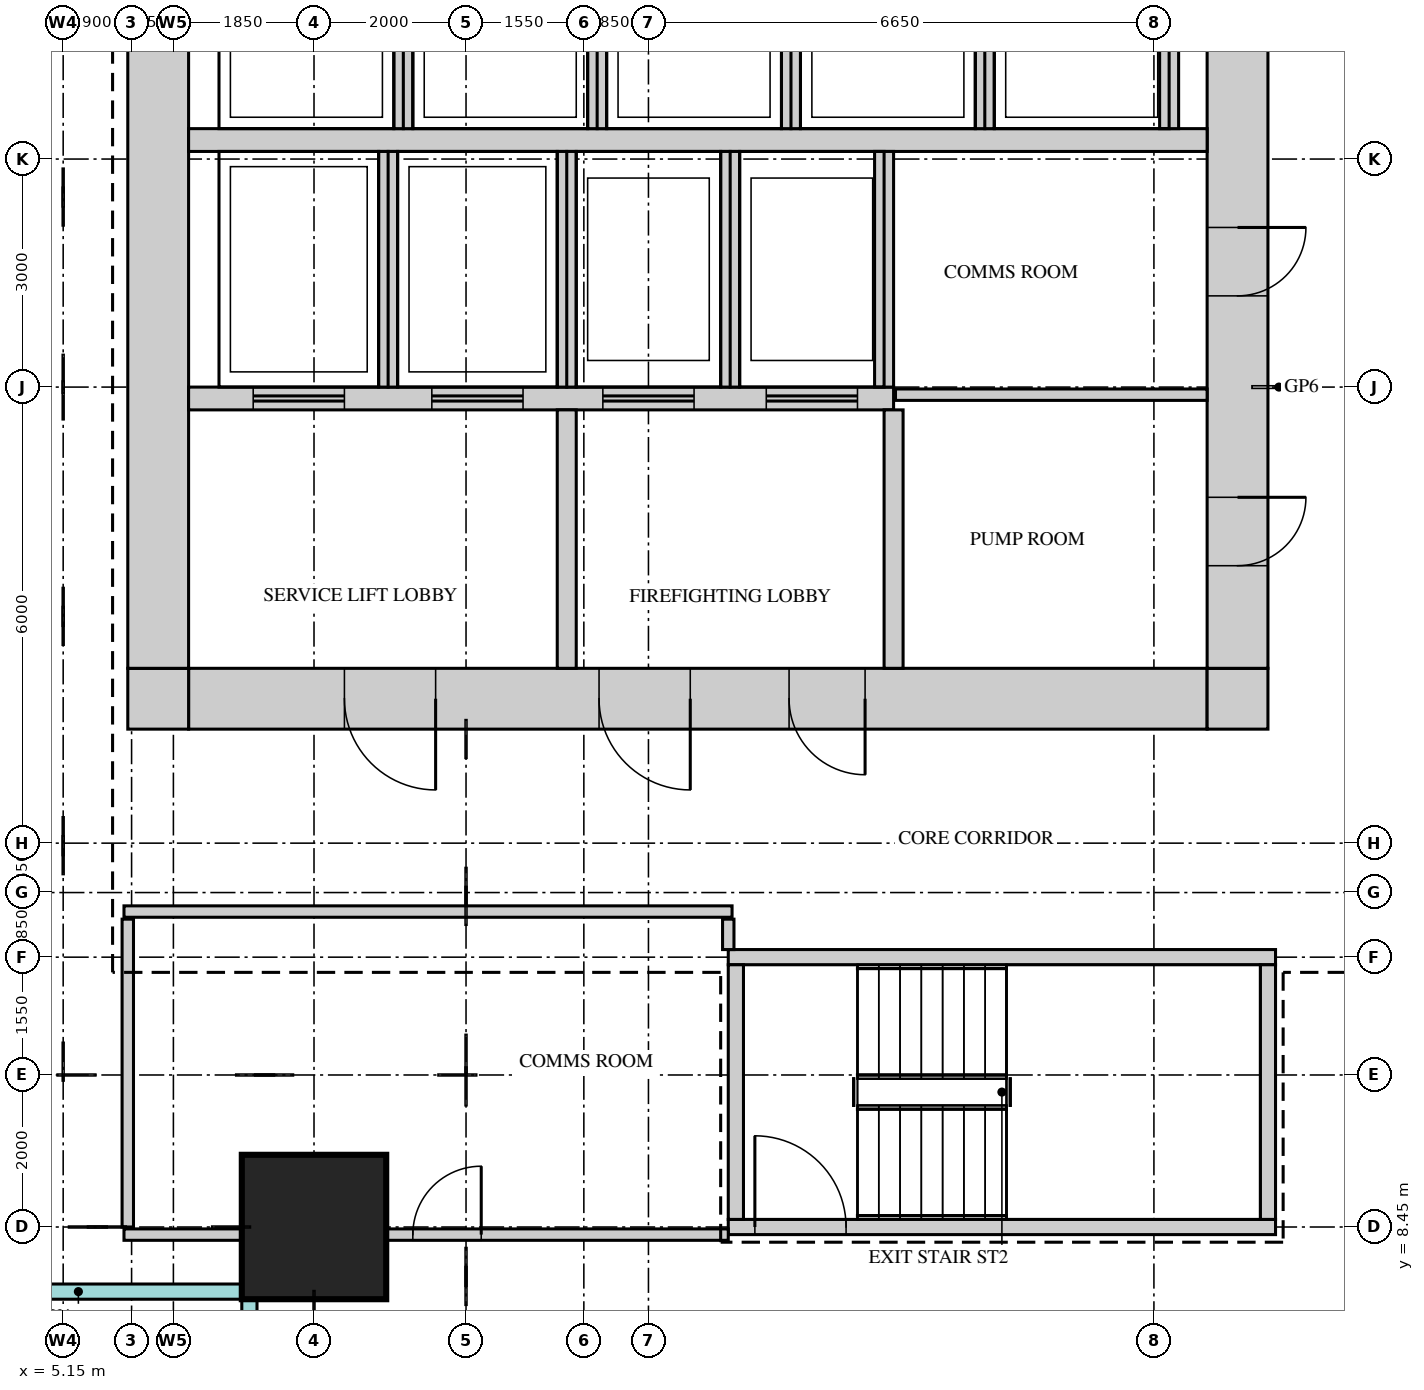
"""IFC4 building model, lengths in metres.
Left out: names, types, materials, properties, quantities, classifications, styles, units other than length and angle.
Written with IfcOpenShell. Run it as: python <this file> out.ifc"""

import sys

from ifc_helpers import new_model, si_unit, direction, frame, frame_2d, origin, origin_2d, place, context, subcontext, project, spatial, rectangle, extrude, source, transform, mapped, element, fill, save


model = new_model("IFC4")
c1 = context("Model", 3, precision=1e-05, world=origin(), true_north=direction((0.0, 1.0)))
c2 = subcontext(c1, "Body", "Model", "MODEL_VIEW")
j1 = project(units=[si_unit("LENGTHUNIT", "METRE"), si_unit("PLANEANGLEUNIT", "RADIAN")], contexts=[c1])
p1 = place(None, origin())
s1 = spatial("IfcSite", under=j1, at=p1, CompositionType="ELEMENT")
p2 = place(p1, origin())
s2 = spatial("IfcBuilding", under=s1, at=p2, CompositionType="ELEMENT")
p3 = place(p2, frame((0.0, 0.0, 216.7)))
s3 = spatial("IfcBuildingStorey", under=s2, at=p3, CompositionType="ELEMENT", Elevation=216.7)
m1 = source(origin(), c2, "Body", "SweptSolid", [
    extrude(rectangle(XDim=13.4, YDim=0.8, at=frame_2d((6.7, 0.0))), origin(), (0.0, 0.0, 1.0), 5.25),
])
p4 = place(p3, frame((6.8, 15.4, 0.0), z_axis=(0.0, 0.0, 1.0), x_axis=(1.0, 0.0, 0.0)))
e1 = element("IfcWall", 1, at=p4, inside=s3, PredefinedType="SHEAR", context=c2, shape_type="MappedRepresentation", body=[
    mapped(m1, transform((0.0, 0.0, 0.0))),
])
m2 = source(origin(), c2, "Body", "SweptSolid", [
    extrude(rectangle(XDim=1.2, YDim=2.1, at=frame_2d((0.6, 1.05))), frame((0.0, 0.41, 0.0), z_axis=(0.0, -1.0, 0.0), x_axis=(1.0, 0.0, 0.0)), (0.0, 0.0, 1.0), 0.82),
])
p5 = place(p4, frame((5.4, 0.0, 0.0)))
e2 = element("IfcOpeningElement", 2, at=p5, cuts=e1, PredefinedType="OPENING", context=c2, shape_type="MappedRepresentation", body=[
    mapped(m2, transform((0.0, 0.0, 0.0))),
])
p6 = place(p4, frame((2.05, 0.0, 0.0)))
e3 = element("IfcOpeningElement", 3, at=p6, cuts=e1, PredefinedType="OPENING", context=c2, shape_type="MappedRepresentation", body=[
    mapped(m2, transform((0.0, 0.0, 0.0))),
])
m3 = source(origin(), c2, "Body", "SweptSolid", [
    extrude(rectangle(XDim=1.0, YDim=2.1, at=frame_2d((0.5, 1.05))), frame((0.0, 0.41, 0.0), z_axis=(0.0, -1.0, 0.0), x_axis=(1.0, 0.0, 0.0)), (0.0, 0.0, 1.0), 0.82),
])
p7 = place(p4, frame((7.9, 0.0, 0.0)))
e4 = element("IfcOpeningElement", 4, at=p7, cuts=e1, PredefinedType="OPENING", context=c2, shape_type="MappedRepresentation", body=[
    mapped(m3, transform((0.0, 0.0, 0.0))),
])
m4 = source(origin(), c2, "Body", "SweptSolid", [
    extrude(rectangle(XDim=0.8, YDim=0.8, at=frame_2d((0.4, 0.0))), origin(), (0.0, 0.0, 1.0), 5.25),
])
for number, where, z_axis, x_axis in (
    (5, (20.2, 15.4, 0.0), (0.0, 0.0, 1.0), (1.0, 0.0, 0.0)),
    (6, (6.0, 15.4, 0.0), (0.0, 0.0, 1.0), (1.0, 0.0, 0.0)),
):
    element("IfcWall", number, at=place(p3, frame(where, z_axis=z_axis, x_axis=x_axis)), inside=s3, PredefinedType="SHEAR", context=c2, shape_type="MappedRepresentation", body=[
        mapped(m4, transform((0.0, 0.0, 0.0))),
    ])
m5 = source(origin(), c2, "Body", "SweptSolid", [
    extrude(rectangle(XDim=22.4, YDim=0.8, at=frame_2d((11.2, 0.0))), origin(), (0.0, 0.0, 1.0), 5.25),
])
p8 = place(p3, frame((20.6, 15.8, 0.0), z_axis=(0.0, 0.0, 1.0), x_axis=(0.0, 1.0, 0.0)))
e7 = element("IfcWall", 7, at=p8, inside=s3, PredefinedType="SHEAR", context=c2, shape_type="MappedRepresentation", body=[
    mapped(m5, transform((0.0, 0.0, 0.0))),
])
m6 = source(origin(), c2, "Body", "SweptSolid", [
    extrude(rectangle(XDim=1.8, YDim=2.1, at=frame_2d((0.9, 1.05))), frame((0.0, 0.41, 0.0), z_axis=(0.0, -1.0, 0.0), x_axis=(1.0, 0.0, 0.0)), (0.0, 0.0, 1.0), 0.82),
])
p9 = place(p8, frame((10.7, 0.0, 0.0)))
e8 = element("IfcOpeningElement", 8, at=p9, cuts=e7, PredefinedType="OPENING", context=c2, shape_type="MappedRepresentation", body=[
    mapped(m6, transform((0.0, 0.0, 0.0))),
])
m7 = source(origin(), c2, "Body", "SweptSolid", [
    extrude(rectangle(XDim=0.9, YDim=2.1, at=frame_2d((0.45, 1.05))), frame((0.0, 0.41, 0.0), z_axis=(0.0, -1.0, 0.0), x_axis=(1.0, 0.0, 0.0)), (0.0, 0.0, 1.0), 0.82),
])
p10 = place(p8, frame((1.35, 0.0, 0.0)))
e9 = element("IfcOpeningElement", 9, at=p10, cuts=e7, PredefinedType="OPENING", context=c2, shape_type="MappedRepresentation", body=[
    mapped(m7, transform((0.0, 0.0, 0.0))),
])
p11 = place(p8, frame((4.9, 0.0, 0.0)))
e10 = element("IfcOpeningElement", 10, at=p11, cuts=e7, PredefinedType="OPENING", context=c2, shape_type="MappedRepresentation", body=[
    mapped(m7, transform((0.0, 0.0, 0.0))),
])
p12 = place(p3, frame((6.4, 15.8, 0.0), z_axis=(0.0, 0.0, 1.0), x_axis=(0.0, 1.0, 0.0)))
e11 = element("IfcWall", 11, at=p12, inside=s3, PredefinedType="SHEAR", context=c2, shape_type="MappedRepresentation", body=[
    mapped(m5, transform((0.0, 0.0, 0.0))),
])
m8 = source(origin(), c2, "Body", "SweptSolid", [
    extrude(rectangle(XDim=7.2, YDim=0.2, at=frame_2d((3.6, 0.0))), origin(), (0.0, 0.0, 1.0), 5.25),
])
p13 = place(p3, frame((13.9, 12.0, 0.0), z_axis=(0.0, 0.0, 1.0), x_axis=(1.0, 0.0, 0.0)))
e12 = element("IfcWall", 12, at=p13, inside=s3, PredefinedType="SHEAR", context=c2, shape_type="MappedRepresentation", body=[
    mapped(m8, transform((0.0, 0.0, 0.0))),
])
p14 = place(p3, frame((13.9, 8.45, 0.0), z_axis=(0.0, 0.0, 1.0), x_axis=(1.0, 0.0, 0.0)))
e13 = element("IfcWall", 13, at=p14, inside=s3, PredefinedType="SHEAR", context=c2, shape_type="MappedRepresentation", body=[
    mapped(m8, transform((0.0, 0.0, 0.0))),
])
m9 = source(origin(), c2, "Body", "SweptSolid", [
    extrude(rectangle(XDim=1.2, YDim=2.1, at=frame_2d((0.6, 1.05))), frame((0.0, 0.11, 0.0), z_axis=(0.0, -1.0, 0.0), x_axis=(1.0, 0.0, 0.0)), (0.0, 0.0, 1.0), 0.22),
])
p15 = place(p14, frame((0.35, 0.0, 0.0)))
e14 = element("IfcOpeningElement", 14, at=p15, cuts=e13, PredefinedType="OPENING", context=c2, shape_type="MappedRepresentation", body=[
    mapped(m9, transform((0.0, 0.0, 0.0))),
])
m10 = source(origin(), c2, "Body", "SweptSolid", [
    extrude(rectangle(XDim=3.35, YDim=0.2, at=frame_2d((1.675, 0.0))), origin(), (0.0, 0.0, 1.0), 5.25),
])
for number, where, z_axis, x_axis in (
    (15, (21.0, 8.55, 0.0), (0.0, 0.0, 1.0), (0.0, 1.0, 0.0)),
    (16, (14.0, 8.55, 0.0), (0.0, 0.0, 1.0), (0.0, 1.0, 0.0)),
):
    element("IfcWall", number, at=place(p3, frame(where, z_axis=z_axis, x_axis=x_axis)), inside=s3, PredefinedType="SHEAR", context=c2, shape_type="MappedRepresentation", body=[
        mapped(m10, transform((0.0, 0.0, 0.0))),
    ])
m11 = source(origin(), c2, "Body", "SweptSolid", [
    extrude(rectangle(XDim=13.4, YDim=0.3, at=frame_2d((6.7, 0.0))), origin(), (0.0, 0.0, 1.0), 5.25),
])
p16 = place(p3, frame((6.8, 22.75, 0.0), z_axis=(0.0, 0.0, 1.0), x_axis=(1.0, 0.0, 0.0)))
e17 = element("IfcWall", 17, at=p16, inside=s3, PredefinedType="STANDARD", context=c2, shape_type="MappedRepresentation", body=[
    mapped(m11, transform((0.0, 0.0, 0.0))),
])
m12 = source(origin(), c2, "Body", "SweptSolid", [
    extrude(rectangle(XDim=9.275, YDim=0.3, at=frame_2d((4.637, 0.0))), origin(), (0.0, 0.0, 1.0), 5.25),
])
p17 = place(p3, frame((6.8, 19.35, 0.0), z_axis=(0.0, 0.0, 1.0), x_axis=(1.0, 0.0, 0.0)))
e18 = element("IfcWall", 18, at=p17, inside=s3, PredefinedType="STANDARD", context=c2, shape_type="MappedRepresentation", body=[
    mapped(m12, transform((0.0, 0.0, 0.0))),
])
m13 = source(origin(), c2, "Body", "SweptSolid", [
    extrude(rectangle(XDim=1.2, YDim=2.1, at=frame_2d((0.6, 1.05))), frame((0.0, 0.16, 0.0), z_axis=(0.0, -1.0, 0.0), x_axis=(1.0, 0.0, 0.0)), (0.0, 0.0, 1.0), 0.32),
])
p18 = place(p17, frame((0.85, 0.0, 0.0)))
e19 = element("IfcOpeningElement", 19, at=p18, cuts=e18, PredefinedType="OPENING", context=c2, shape_type="MappedRepresentation", body=[
    mapped(m13, transform((0.0, 0.0, 0.0))),
])
p19 = place(p17, frame((3.2, 0.0, 0.0)))
e20 = element("IfcOpeningElement", 20, at=p19, cuts=e18, PredefinedType="OPENING", context=c2, shape_type="MappedRepresentation", body=[
    mapped(m13, transform((0.0, 0.0, 0.0))),
])
p20 = place(p17, frame((5.45, 0.0, 0.0)))
e21 = element("IfcOpeningElement", 21, at=p20, cuts=e18, PredefinedType="OPENING", context=c2, shape_type="MappedRepresentation", body=[
    mapped(m13, transform((0.0, 0.0, 0.0))),
])
p21 = place(p17, frame((7.6, 0.0, 0.0)))
e22 = element("IfcOpeningElement", 22, at=p21, cuts=e18, PredefinedType="OPENING", context=c2, shape_type="MappedRepresentation", body=[
    mapped(m13, transform((0.0, 0.0, 0.0))),
])
m14 = source(origin(), c2, "Body", "SweptSolid", [
    extrude(rectangle(XDim=3.1, YDim=0.25, at=frame_2d((1.55, 0.0))), origin(), (0.0, 0.0, 1.0), 5.25),
])
for number, where, z_axis, x_axis in (
    (23, (9.425, 19.5, 0.0), (0.0, 0.0, 1.0), (0.0, 1.0, 0.0)),
    (24, (11.775, 19.5, 0.0), (0.0, 0.0, 1.0), (0.0, 1.0, 0.0)),
    (25, (13.925, 19.5, 0.0), (0.0, 0.0, 1.0), (0.0, 1.0, 0.0)),
    (26, (15.95, 19.5, 0.0), (0.0, 0.0, 1.0), (0.0, 1.0, 0.0)),
):
    element("IfcWall", number, at=place(p3, frame(where, z_axis=z_axis, x_axis=x_axis)), inside=s3, PredefinedType="STANDARD", context=c2, shape_type="MappedRepresentation", body=[
        mapped(m14, transform((0.0, 0.0, 0.0))),
    ])
m15 = source(origin(), c2, "Body", "SweptSolid", [
    extrude(rectangle(XDim=2.4, YDim=0.25, at=frame_2d((1.2, 0.0))), origin(), (0.0, 0.0, 1.0), 5.25),
])
for number, where, z_axis, x_axis in (
    (27, (17.275, 22.9, 0.0), (0.0, 0.0, 1.0), (0.0, 1.0, 0.0)),
    (28, (19.7, 22.9, 0.0), (0.0, 0.0, 1.0), (0.0, 1.0, 0.0)),
    (29, (9.625, 22.9, 0.0), (0.0, 0.0, 1.0), (0.0, 1.0, 0.0)),
    (30, (12.175, 22.9, 0.0), (0.0, 0.0, 1.0), (0.0, 1.0, 0.0)),
    (31, (14.725, 22.9, 0.0), (0.0, 0.0, 1.0), (0.0, 1.0, 0.0)),
):
    element("IfcWall", number, at=place(p3, frame(where, z_axis=z_axis, x_axis=x_axis)), inside=s3, PredefinedType="STANDARD", context=c2, shape_type="MappedRepresentation", body=[
        mapped(m15, transform((0.0, 0.0, 0.0))),
    ])
m16 = source(origin(), c2, "Body", "SweptSolid", [
    extrude(rectangle(XDim=3.4, YDim=0.25, at=frame_2d((1.7, 0.0))), origin(), (0.0, 0.0, 1.0), 5.25),
])
for number, where, z_axis, x_axis in (
    (32, (16.075, 15.8, 0.0), (0.0, 0.0, 1.0), (0.0, 1.0, 0.0)),
    (33, (11.775, 15.8, 0.0), (0.0, 0.0, 1.0), (0.0, 1.0, 0.0)),
):
    element("IfcWall", number, at=place(p3, frame(where, z_axis=z_axis, x_axis=x_axis)), inside=s3, PredefinedType="STANDARD", context=c2, shape_type="MappedRepresentation", body=[
        mapped(m16, transform((0.0, 0.0, 0.0))),
    ])
m17 = source(origin(), c2, "Body", "SweptSolid", [
    extrude(rectangle(XDim=1.9, YDim=1.9, at=origin_2d()), origin(), (0.0, 0.0, 1.0), 5.5),
])
p22 = place(p3, frame((8.45, 8.45, 0.0), z_axis=(0.0, 0.0, 1.0), x_axis=(1.0, 0.0, 0.0)))
e34 = element("IfcColumn", 34, at=p22, inside=s3, PredefinedType="COLUMN", context=c2, shape_type="MappedRepresentation", body=[
    mapped(m17, transform((0.0, 0.0, 0.0))),
])
m18 = source(origin(), c2, "Body", "SweptSolid", [
    extrude(rectangle(XDim=7.95, YDim=0.15, at=frame_2d((3.975, 0.0))), origin(), (0.0, 0.0, 1.0), 5.25),
])
p23 = place(p3, frame((5.95, 8.35, 0.0), z_axis=(0.0, 0.0, 1.0), x_axis=(1.0, 0.0, 0.0)))
e35 = element("IfcWall", 35, at=p23, inside=s3, PredefinedType="PARTITIONING", context=c2, shape_type="MappedRepresentation", body=[
    mapped(m18, transform((0.0, 0.0, 0.0))),
])
m19 = source(origin(), c2, "Body", "SweptSolid", [
    extrude(rectangle(XDim=0.9, YDim=2.1, at=frame_2d((0.45, 1.05))), frame((0.0, 0.085, 0.0), z_axis=(0.0, -1.0, 0.0), x_axis=(1.0, 0.0, 0.0)), (0.0, 0.0, 1.0), 0.17),
])
p24 = place(p23, frame((3.8, 0.0, 0.0)))
e36 = element("IfcOpeningElement", 36, at=p24, cuts=e35, PredefinedType="OPENING", context=c2, shape_type="MappedRepresentation", body=[
    mapped(m19, transform((0.0, 0.0, 0.0))),
])
m20 = source(origin(), c2, "Body", "SweptSolid", [
    extrude(rectangle(XDim=4.05, YDim=0.15, at=frame_2d((2.025, 0.0))), origin(), (0.0, 0.0, 1.0), 5.25),
])
p25 = place(p3, frame((6.0, 8.45, 0.0), z_axis=(0.0, 0.0, 1.0), x_axis=(0.0, 1.0, 0.0)))
e37 = element("IfcWall", 37, at=p25, inside=s3, PredefinedType="PARTITIONING", context=c2, shape_type="MappedRepresentation", body=[
    mapped(m20, transform((0.0, 0.0, 0.0))),
])
m21 = source(origin(), c2, "Body", "SweptSolid", [
    extrude(rectangle(XDim=0.4, YDim=0.15, at=frame_2d((0.2, 0.0))), origin(), (0.0, 0.0, 1.0), 5.25),
])
p26 = place(p3, frame((13.9, 12.1, 0.0), z_axis=(0.0, 0.0, 1.0), x_axis=(0.0, 1.0, 0.0)))
e38 = element("IfcWall", 38, at=p26, inside=s3, PredefinedType="PARTITIONING", context=c2, shape_type="MappedRepresentation", body=[
    mapped(m21, transform((0.0, 0.0, 0.0))),
])
m22 = source(origin(), c2, "Body", "SweptSolid", [
    extrude(rectangle(XDim=8.0, YDim=0.15, at=frame_2d((4.0, 0.0))), origin(), (0.0, 0.0, 1.0), 5.25),
])
p27 = place(p3, frame((5.95, 12.6, 0.0), z_axis=(0.0, 0.0, 1.0), x_axis=(1.0, 0.0, 0.0)))
e39 = element("IfcWall", 39, at=p27, inside=s3, PredefinedType="PARTITIONING", context=c2, shape_type="MappedRepresentation", body=[
    mapped(m22, transform((0.0, 0.0, 0.0))),
])
m23 = source(origin(), c2, "Body", "SweptSolid", [
    extrude(rectangle(XDim=4.1, YDim=0.15, at=frame_2d((2.05, 0.0))), origin(), (0.0, 0.0, 1.0), 5.25),
])
p28 = place(p3, frame((16.1, 19.4, 0.0), z_axis=(0.0, 0.0, 1.0), x_axis=(1.0, 0.0, 0.0)))
e40 = element("IfcWall", 40, at=p28, inside=s3, PredefinedType="PARTITIONING", context=c2, shape_type="MappedRepresentation", body=[
    mapped(m23, transform((0.0, 0.0, 0.0))),
])
m24 = source(origin(), c2, "Body", "SweptSolid", [
    extrude(rectangle(XDim=0.9, YDim=2.1, at=frame_2d((0.45, 1.05))), frame((0.0, 0.35, 0.0), z_axis=(0.0, -1.0, 0.0), x_axis=(1.0, 0.0, 0.0)), (0.0, 0.0, 1.0), 0.7),
])
p29 = place(p10, origin())
e41 = element("IfcDoor", 41, at=p29, inside=s3, OperationType="SINGLE_SWING_RIGHT", PredefinedType="DOOR", context=c2, shape_type="MappedRepresentation", body=[
    mapped(m24, transform((0.0, 0.0, 0.0))),
])
fill(e9, e41)
p30 = place(p11, origin())
e42 = element("IfcDoor", 42, at=p30, inside=s3, OperationType="SINGLE_SWING_RIGHT", PredefinedType="DOOR", context=c2, shape_type="MappedRepresentation", body=[
    mapped(m24, transform((0.0, 0.0, 0.0))),
])
fill(e10, e42)
m25 = source(origin(), c2, "Body", "SweptSolid", [
    extrude(rectangle(XDim=1.2, YDim=2.1, at=frame_2d((0.6, 1.05))), frame((0.0, 0.35, 0.0), z_axis=(0.0, -1.0, 0.0), x_axis=(1.0, 0.0, 0.0)), (0.0, 0.0, 1.0), 0.7),
])
p31 = place(p5, origin())
e43 = element("IfcDoor", 43, at=p31, inside=s3, OperationType="SINGLE_SWING_RIGHT", PredefinedType="DOOR", context=c2, shape_type="MappedRepresentation", body=[
    mapped(m25, transform((0.0, 0.0, 0.0))),
])
fill(e2, e43)
p32 = place(p6, origin())
e44 = element("IfcDoor", 44, at=p32, inside=s3, OperationType="SINGLE_SWING_RIGHT", PredefinedType="DOOR", context=c2, shape_type="MappedRepresentation", body=[
    mapped(m25, transform((0.0, 0.0, 0.0))),
])
fill(e3, e44)
m26 = source(origin(), c2, "Body", "SweptSolid", [
    extrude(rectangle(XDim=1.0, YDim=2.1, at=frame_2d((0.5, 1.05))), frame((0.0, 0.35, 0.0), z_axis=(0.0, -1.0, 0.0), x_axis=(1.0, 0.0, 0.0)), (0.0, 0.0, 1.0), 0.7),
])
p33 = place(p7, origin())
e45 = element("IfcDoor", 45, at=p33, inside=s3, OperationType="SINGLE_SWING_RIGHT", PredefinedType="DOOR", context=c2, shape_type="MappedRepresentation", body=[
    mapped(m26, transform((0.0, 0.0, 0.0))),
])
fill(e4, e45)
m27 = source(origin(), c2, "Body", "SweptSolid", [
    extrude(rectangle(XDim=0.9, YDim=2.1, at=frame_2d((0.45, 1.05))), frame((0.0, 0.025, 0.0), z_axis=(0.0, -1.0, 0.0), x_axis=(1.0, 0.0, 0.0)), (0.0, 0.0, 1.0), 0.05),
])
p34 = place(p24, origin())
e46 = element("IfcDoor", 46, at=p34, inside=s3, OperationType="SINGLE_SWING_LEFT", PredefinedType="DOOR", context=c2, shape_type="MappedRepresentation", body=[
    mapped(m27, transform((0.0, 0.0, 0.0))),
])
fill(e36, e46)
m28 = source(origin(), c2, "Body", "SweptSolid", [
    extrude(rectangle(XDim=1.2, YDim=2.1, at=frame_2d((0.6, 1.05))), frame((0.0, 0.025, 0.0), z_axis=(0.0, -1.0, 0.0), x_axis=(1.0, 0.0, 0.0)), (0.0, 0.0, 1.0), 0.05),
])
p35 = place(p15, origin())
e47 = element("IfcDoor", 47, at=p35, inside=s3, OperationType="SINGLE_SWING_RIGHT", PredefinedType="DOOR", context=c2, shape_type="MappedRepresentation", body=[
    mapped(m28, transform((0.0, 0.0, 0.0))),
])
fill(e14, e47)
p36 = place(p18, origin())
e48 = element("IfcDoor", 48, at=p36, inside=s3, OperationType="DOUBLE_DOOR_SLIDING", PredefinedType="DOOR", context=c2, shape_type="MappedRepresentation", body=[
    mapped(m28, transform((0.0, 0.0, 0.0))),
])
fill(e19, e48)
p37 = place(p19, origin())
e49 = element("IfcDoor", 49, at=p37, inside=s3, OperationType="DOUBLE_DOOR_SLIDING", PredefinedType="DOOR", context=c2, shape_type="MappedRepresentation", body=[
    mapped(m28, transform((0.0, 0.0, 0.0))),
])
fill(e20, e49)
p38 = place(p20, origin())
e50 = element("IfcDoor", 50, at=p38, inside=s3, OperationType="DOUBLE_DOOR_SLIDING", PredefinedType="DOOR", context=c2, shape_type="MappedRepresentation", body=[
    mapped(m28, transform((0.0, 0.0, 0.0))),
])
fill(e21, e50)
p39 = place(p21, origin())
e51 = element("IfcDoor", 51, at=p39, inside=s3, OperationType="DOUBLE_DOOR_SLIDING", PredefinedType="DOOR", context=c2, shape_type="MappedRepresentation", body=[
    mapped(m28, transform((0.0, 0.0, 0.0))),
])
fill(e22, e51)
save(model, sys.argv[1])
